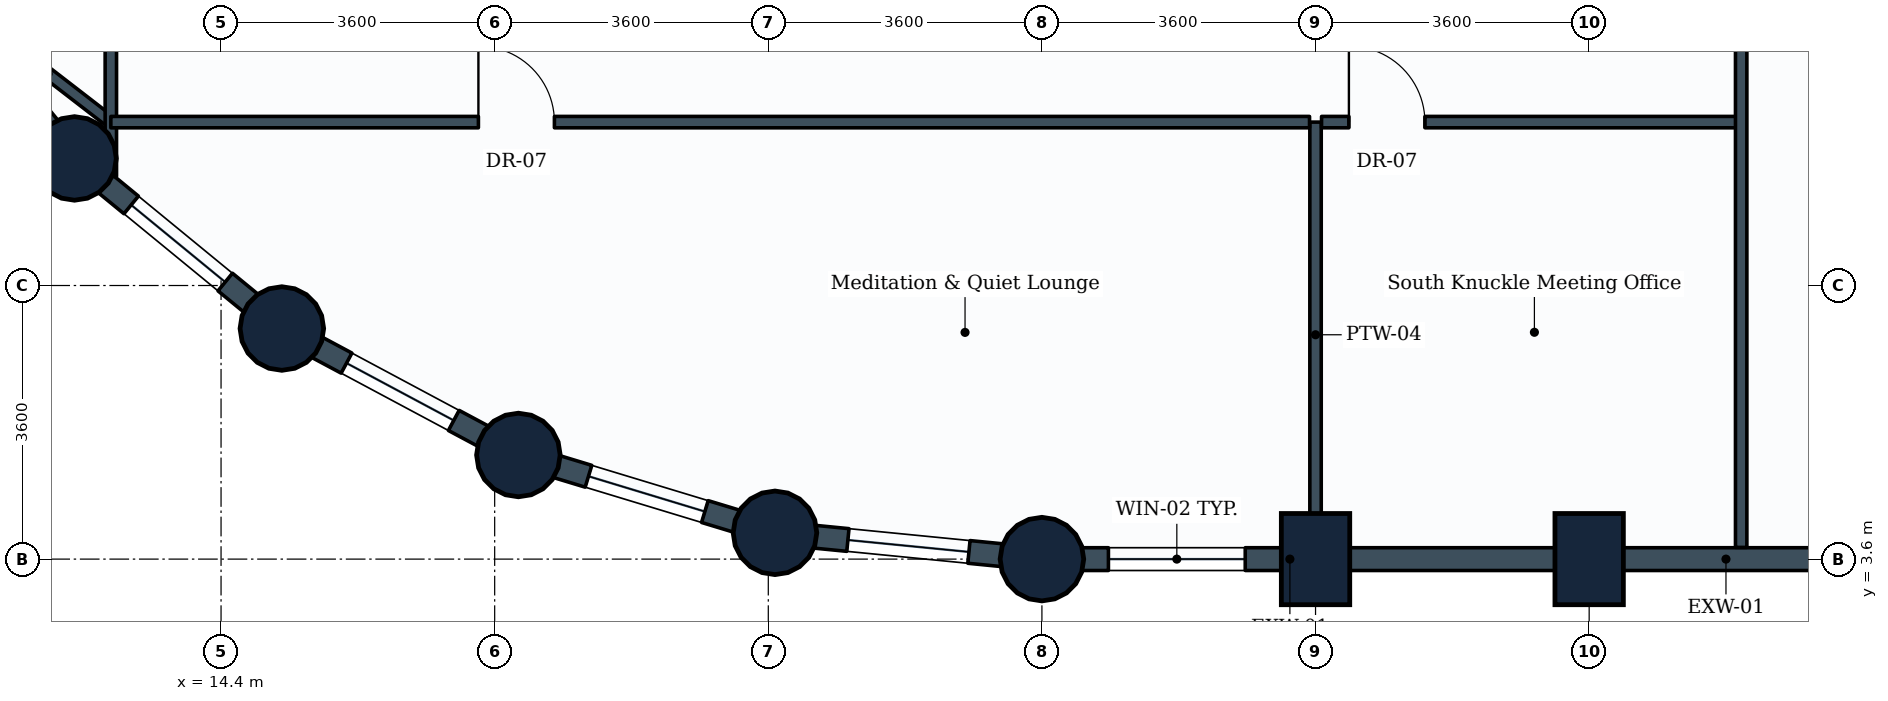
"""IFC4 building model, lengths in metres.
Left out: names, types, materials, properties, quantities, classifications, styles, units other than length and angle.
Written with IfcOpenShell. Run it as: python <this file> out.ifc"""

import sys

from ifc_helpers import new_model, si_unit, direction, frame, frame_2d, origin, origin_2d, place, context, subcontext, project, spatial, rectangle, circle, extrude, element, fill, save


model = new_model("IFC4")
c1 = context("Model", 3, precision=1e-05, world=origin(), true_north=direction((0.0, 1.0)))
c2 = subcontext(c1, "Body", "Model", "MODEL_VIEW")
j1 = project(units=[si_unit("LENGTHUNIT", "METRE"), si_unit("PLANEANGLEUNIT", "RADIAN")], contexts=[c1])
p1 = place(None, origin())
s1 = spatial("IfcSite", under=j1, at=p1, CompositionType="ELEMENT")
p2 = place(p1, origin())
s2 = spatial("IfcBuilding", under=s1, at=p2, CompositionType="ELEMENT")
p3 = place(p2, frame((0.0, 0.0, 47.4)))
s3 = spatial("IfcBuildingStorey", under=s2, at=p3, CompositionType="ELEMENT", Elevation=47.4)
for number, where, z_axis, x_axis in (
    (1, (12.472, 8.872, 0.0), (0.0, 0.0, 1.0), (1.0, 0.0, 0.0)),
    (2, (15.2, 6.634, 0.0), (0.0, 0.0, 1.0), (1.0, 0.0, 0.0)),
    (3, (18.312, 4.97, 0.0), (0.0, 0.0, 1.0), (1.0, 0.0, 0.0)),
    (4, (21.688, 3.946, 0.0), (0.0, 0.0, 1.0), (1.0, 0.0, 0.0)),
    (5, (25.2, 3.6, 0.0), (0.0, 0.0, 1.0), (1.0, 0.0, 0.0)),
):
    element("IfcColumn", number, at=place(p3, frame(where, z_axis=z_axis, x_axis=x_axis)), inside=s3, PredefinedType="COLUMN", context=c2, shape_type="SweptSolid", body=[
        extrude(circle(Radius=0.55, at=origin_2d()), origin(), (0.0, 0.0, 1.0), 3.9),
    ])
for number, where, z_axis, x_axis in (
    (6, (28.8, 3.6, 0.0), (0.0, 0.0, 1.0), (1.0, 0.0, 0.0)),
    (7, (32.4, 3.6, 0.0), (0.0, 0.0, 1.0), (1.0, 0.0, 0.0)),
):
    element("IfcColumn", number, at=place(p3, frame(where, z_axis=z_axis, x_axis=x_axis)), inside=s3, PredefinedType="COLUMN", context=c2, shape_type="SweptSolid", body=[
        extrude(rectangle(XDim=0.9, YDim=1.2, at=origin_2d()), origin(), (0.0, 0.0, 1.0), 3.9),
    ])
p4 = place(p3, frame((28.8, 3.6, 0.0), z_axis=(0.0, 0.0, 1.0), x_axis=(-1.0, 0.0, 0.0)))
e8 = element("IfcWall", 8, at=p4, inside=s3, PredefinedType="STANDARD", context=c2, shape_type="SweptSolid", body=[
    extrude(rectangle(XDim=3.6, YDim=0.3, at=frame_2d((1.8, 0.0))), origin(), (0.0, 0.0, 1.0), 2.93),
])
p5 = place(p4, frame((0.925, 0.0, 0.85)))
e9 = element("IfcOpeningElement", 9, at=p5, cuts=e8, PredefinedType="OPENING", context=c2, shape_type="SweptSolid", body=[
    extrude(rectangle(XDim=1.8, YDim=1.35, at=frame_2d((0.9, 0.675))), frame((0.0, 0.16, 0.0), z_axis=(0.0, -1.0, 0.0), x_axis=(1.0, 0.0, 0.0)), (0.0, 0.0, 1.0), 0.32),
])
p6 = place(p3, frame((32.4, 3.6, 0.0), z_axis=(0.0, 0.0, 1.0), x_axis=(-1.0, 0.0, 0.0)))
e10 = element("IfcWall", 10, at=p6, inside=s3, PredefinedType="STANDARD", context=c2, shape_type="SweptSolid", body=[
    extrude(rectangle(XDim=3.6, YDim=0.3, at=frame_2d((1.8, 0.0))), origin(), (0.0, 0.0, 1.0), 2.93),
])
p7 = place(p3, frame((36.0, 3.6, 0.0), z_axis=(0.0, 0.0, 1.0), x_axis=(-1.0, 0.0, 0.0)))
e11 = element("IfcWall", 11, at=p7, inside=s3, PredefinedType="STANDARD", context=c2, shape_type="SweptSolid", body=[
    extrude(rectangle(XDim=3.6, YDim=0.3, at=frame_2d((1.8, 0.0))), origin(), (0.0, 0.0, 1.0), 2.93),
])
p8 = place(p3, frame((12.472, 8.872, 0.0), z_axis=(0.0, 0.0, 1.0), x_axis=(-0.634258295121, 0.773121216285, 0.0)))
e12 = element("IfcWall", 12, at=p8, inside=s3, PredefinedType="STANDARD", context=c2, shape_type="SweptSolid", body=[
    extrude(rectangle(XDim=3.529, YDim=0.3, at=frame_2d((1.764, 0.0))), origin(), (0.0, 0.0, 1.0), 2.93),
])
p9 = place(p3, frame((15.2, 6.634, 0.0), z_axis=(0.0, 0.0, 1.0), x_axis=(-0.773121216285, 0.634258295121, 0.0)))
e13 = element("IfcWall", 13, at=p9, inside=s3, PredefinedType="STANDARD", context=c2, shape_type="SweptSolid", body=[
    extrude(rectangle(XDim=3.529, YDim=0.3, at=frame_2d((1.764, 0.0))), origin(), (0.0, 0.0, 1.0), 2.93),
])
p10 = place(p9, frame((0.964, 0.0, 0.85)))
e14 = element("IfcOpeningElement", 14, at=p10, cuts=e13, PredefinedType="OPENING", context=c2, shape_type="SweptSolid", body=[
    extrude(rectangle(XDim=1.6, YDim=1.35, at=frame_2d((0.8, 0.675))), frame((0.0, 0.16, 0.0), z_axis=(0.0, -1.0, 0.0), x_axis=(1.0, 0.0, 0.0)), (0.0, 0.0, 1.0), 0.32),
])
p11 = place(p3, frame((18.312, 4.97, 0.0), z_axis=(0.0, 0.0, 1.0), x_axis=(-0.881846862014, 0.471535907389, 0.0)))
e15 = element("IfcWall", 15, at=p11, inside=s3, PredefinedType="STANDARD", context=c2, shape_type="SweptSolid", body=[
    extrude(rectangle(XDim=3.529, YDim=0.3, at=frame_2d((1.765, 0.0))), origin(), (0.0, 0.0, 1.0), 2.93),
])
p12 = place(p11, frame((0.964, 0.0, 0.85)))
e16 = element("IfcOpeningElement", 16, at=p12, cuts=e15, PredefinedType="OPENING", context=c2, shape_type="SweptSolid", body=[
    extrude(rectangle(XDim=1.6, YDim=1.35, at=frame_2d((0.8, 0.675))), frame((0.0, 0.16, 0.0), z_axis=(0.0, -1.0, 0.0), x_axis=(1.0, 0.0, 0.0)), (0.0, 0.0, 1.0), 0.32),
])
p13 = place(p3, frame((21.688, 3.946, 0.0), z_axis=(0.0, 0.0, 1.0), x_axis=(-0.956953367403, 0.290241714123, 0.0)))
e17 = element("IfcWall", 17, at=p13, inside=s3, PredefinedType="STANDARD", context=c2, shape_type="SweptSolid", body=[
    extrude(rectangle(XDim=3.528, YDim=0.3, at=frame_2d((1.764, 0.0))), origin(), (0.0, 0.0, 1.0), 2.93),
])
p14 = place(p13, frame((0.964, 0.0, 0.85)))
e18 = element("IfcOpeningElement", 18, at=p14, cuts=e17, PredefinedType="OPENING", context=c2, shape_type="SweptSolid", body=[
    extrude(rectangle(XDim=1.6, YDim=1.35, at=frame_2d((0.8, 0.675))), frame((0.0, 0.16, 0.0), z_axis=(0.0, -1.0, 0.0), x_axis=(1.0, 0.0, 0.0)), (0.0, 0.0, 1.0), 0.32),
])
p15 = place(p3, frame((25.2, 3.6, 0.0), z_axis=(0.0, 0.0, 1.0), x_axis=(-0.995183369056, 0.098030923459, 0.0)))
e19 = element("IfcWall", 19, at=p15, inside=s3, PredefinedType="STANDARD", context=c2, shape_type="SweptSolid", body=[
    extrude(rectangle(XDim=3.529, YDim=0.3, at=frame_2d((1.765, 0.0))), origin(), (0.0, 0.0, 1.0), 2.93),
])
p16 = place(p15, frame((0.965, 0.0, 0.85)))
e20 = element("IfcOpeningElement", 20, at=p16, cuts=e19, PredefinedType="OPENING", context=c2, shape_type="SweptSolid", body=[
    extrude(rectangle(XDim=1.6, YDim=1.35, at=frame_2d((0.8, 0.675))), frame((0.0, 0.16, 0.0), z_axis=(0.0, -1.0, 0.0), x_axis=(1.0, 0.0, 0.0)), (0.0, 0.0, 1.0), 0.32),
])
p17 = place(p3, frame((28.8, 9.35, 0.0), z_axis=(0.0, 0.0, 1.0), x_axis=(0.0, -1.0, 0.0)))
e21 = element("IfcWall", 21, at=p17, inside=s3, PredefinedType="PARTITIONING", context=c2, shape_type="SweptSolid", body=[
    extrude(rectangle(XDim=5.596, YDim=0.15, at=frame_2d((2.798, 0.0))), origin(), (0.0, 0.0, 1.0), 3.635),
])
p18 = place(p3, frame((12.95, 9.35, 0.0), z_axis=(0.0, 0.0, 1.0), x_axis=(-0.791573423038, 0.611074067474, 0.0)))
e22 = element("IfcWall", 22, at=p18, inside=s3, PredefinedType="PARTITIONING", context=c2, shape_type="SweptSolid", body=[
    extrude(rectangle(XDim=2.084, YDim=0.15, at=frame_2d((1.042, 0.0))), origin(), (0.0, 0.0, 1.0), 2.93),
])
p19 = place(p3, frame((12.95, 8.634, 0.0), z_axis=(0.0, 0.0, 1.0), x_axis=(0.0, 1.0, 0.0)))
e23 = element("IfcWall", 23, at=p19, inside=s3, PredefinedType="PARTITIONING", context=c2, shape_type="SweptSolid", body=[
    extrude(rectangle(XDim=7.887, YDim=0.15, at=frame_2d((3.944, 0.0))), origin(), (0.0, 0.0, 1.0), 2.93),
])
p20 = place(p19, frame((4.947, 0.0, 0.0)))
e24 = element("IfcOpeningElement", 24, at=p20, cuts=e23, PredefinedType="OPENING", context=c2, shape_type="SweptSolid", body=[
    extrude(rectangle(XDim=1.0, YDim=2.1, at=frame_2d((0.5, 1.05))), frame((0.0, 0.085, 0.0), z_axis=(0.0, -1.0, 0.0), x_axis=(1.0, 0.0, 0.0)), (0.0, 0.0, 1.0), 0.17),
])
p21 = place(p3, frame((12.95, 9.35, 0.0), z_axis=(0.0, 0.0, 1.0), x_axis=(1.0, 0.0, 0.0)))
e25 = element("IfcWall", 25, at=p21, inside=s3, PredefinedType="PARTITIONING", context=c2, shape_type="SweptSolid", body=[
    extrude(rectangle(XDim=15.771, YDim=0.15, at=frame_2d((7.885, 0.0))), origin(), (0.0, 0.0, 1.0), 3.04),
])
p22 = place(p21, frame((4.836, 0.0, 0.0)))
e26 = element("IfcOpeningElement", 26, at=p22, cuts=e25, PredefinedType="OPENING", context=c2, shape_type="SweptSolid", body=[
    extrude(rectangle(XDim=1.0, YDim=2.1, at=frame_2d((0.5, 1.05))), frame((0.0, 0.085, 0.0), z_axis=(0.0, -1.0, 0.0), x_axis=(1.0, 0.0, 0.0)), (0.0, 0.0, 1.0), 0.17),
])
p23 = place(p3, frame((28.879, 9.35, 0.0), z_axis=(0.0, 0.0, 1.0), x_axis=(1.0, 0.0, 0.0)))
e27 = element("IfcWall", 27, at=p23, inside=s3, PredefinedType="PARTITIONING", context=c2, shape_type="SweptSolid", body=[
    extrude(rectangle(XDim=5.521, YDim=0.15, at=frame_2d((2.76, 0.0))), origin(), (0.0, 0.0, 1.0), 3.635),
])
p24 = place(p23, frame((0.36, 0.0, 0.0)))
e28 = element("IfcOpeningElement", 28, at=p24, cuts=e27, PredefinedType="OPENING", context=c2, shape_type="SweptSolid", body=[
    extrude(rectangle(XDim=1.0, YDim=2.1, at=frame_2d((0.5, 1.05))), frame((0.0, 0.085, 0.0), z_axis=(0.0, -1.0, 0.0), x_axis=(1.0, 0.0, 0.0)), (0.0, 0.0, 1.0), 0.17),
])
p25 = place(p3, frame((34.4, 3.754, 0.0), z_axis=(0.0, 0.0, 1.0), x_axis=(0.0, 1.0, 0.0)))
e29 = element("IfcWall", 29, at=p25, inside=s3, PredefinedType="PARTITIONING", context=c2, shape_type="SweptSolid", body=[
    extrude(rectangle(XDim=14.096, YDim=0.15, at=frame_2d((7.048, 0.0))), origin(), (0.0, 0.0, 1.0), 2.93),
])
p26 = place(p5, origin())
e30 = element("IfcWindow", 30, at=p26, inside=s3, PartitioningType="SINGLE_PANEL", PredefinedType="WINDOW", context=c2, shape_type="SweptSolid", body=[
    extrude(rectangle(XDim=1.8, YDim=1.35, at=frame_2d((0.9, 0.675))), frame((0.0, 0.03, 0.0), z_axis=(0.0, -1.0, 0.0), x_axis=(1.0, 0.0, 0.0)), (0.0, 0.0, 1.0), 0.06),
])
fill(e9, e30)
p27 = place(p10, origin())
e31 = element("IfcWindow", 31, at=p27, inside=s3, PartitioningType="SINGLE_PANEL", PredefinedType="WINDOW", context=c2, shape_type="SweptSolid", body=[
    extrude(rectangle(XDim=1.6, YDim=1.35, at=frame_2d((0.8, 0.675))), frame((0.0, 0.03, 0.0), z_axis=(0.0, -1.0, 0.0), x_axis=(1.0, 0.0, 0.0)), (0.0, 0.0, 1.0), 0.06),
])
fill(e14, e31)
p28 = place(p12, origin())
e32 = element("IfcWindow", 32, at=p28, inside=s3, PartitioningType="SINGLE_PANEL", PredefinedType="WINDOW", context=c2, shape_type="SweptSolid", body=[
    extrude(rectangle(XDim=1.6, YDim=1.35, at=frame_2d((0.8, 0.675))), frame((0.0, 0.03, 0.0), z_axis=(0.0, -1.0, 0.0), x_axis=(1.0, 0.0, 0.0)), (0.0, 0.0, 1.0), 0.06),
])
fill(e16, e32)
p29 = place(p14, origin())
e33 = element("IfcWindow", 33, at=p29, inside=s3, PartitioningType="SINGLE_PANEL", PredefinedType="WINDOW", context=c2, shape_type="SweptSolid", body=[
    extrude(rectangle(XDim=1.6, YDim=1.35, at=frame_2d((0.8, 0.675))), frame((0.0, 0.03, 0.0), z_axis=(0.0, -1.0, 0.0), x_axis=(1.0, 0.0, 0.0)), (0.0, 0.0, 1.0), 0.06),
])
fill(e18, e33)
p30 = place(p16, origin())
e34 = element("IfcWindow", 34, at=p30, inside=s3, PartitioningType="SINGLE_PANEL", PredefinedType="WINDOW", context=c2, shape_type="SweptSolid", body=[
    extrude(rectangle(XDim=1.6, YDim=1.35, at=frame_2d((0.8, 0.675))), frame((0.0, 0.03, 0.0), z_axis=(0.0, -1.0, 0.0), x_axis=(1.0, 0.0, 0.0)), (0.0, 0.0, 1.0), 0.06),
])
fill(e20, e34)
p31 = place(p22, origin())
e35 = element("IfcDoor", 35, at=p31, inside=s3, OperationType="SINGLE_SWING_LEFT", PredefinedType="DOOR", context=c2, shape_type="SweptSolid", body=[
    extrude(rectangle(XDim=1.0, YDim=2.1, at=frame_2d((0.5, 1.05))), frame((0.0, 0.025, 0.0), z_axis=(0.0, -1.0, 0.0), x_axis=(1.0, 0.0, 0.0)), (0.0, 0.0, 1.0), 0.05),
])
fill(e26, e35)
p32 = place(p24, origin())
e36 = element("IfcDoor", 36, at=p32, inside=s3, OperationType="SINGLE_SWING_LEFT", PredefinedType="DOOR", context=c2, shape_type="SweptSolid", body=[
    extrude(rectangle(XDim=1.0, YDim=2.1, at=frame_2d((0.5, 1.05))), frame((0.0, 0.025, 0.0), z_axis=(0.0, -1.0, 0.0), x_axis=(1.0, 0.0, 0.0)), (0.0, 0.0, 1.0), 0.05),
])
fill(e28, e36)
save(model, sys.argv[1])
